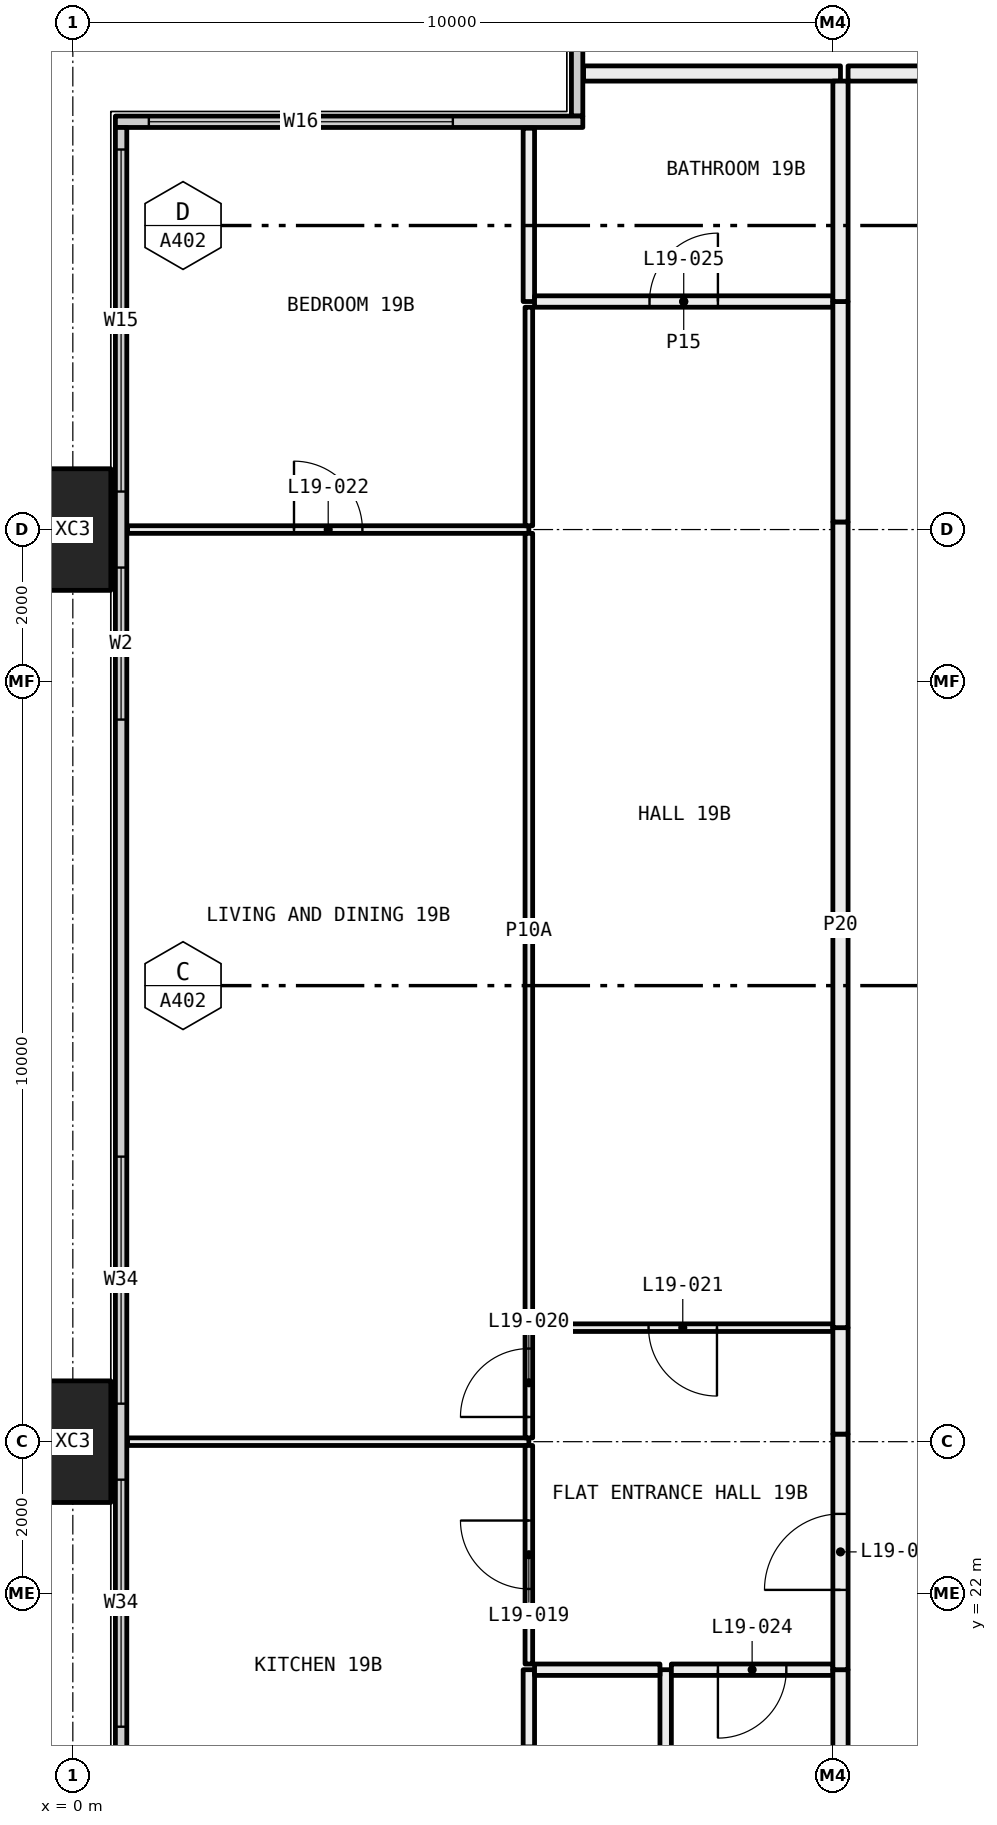
"""IFC4 building model, lengths in metres.
Left out: names, types, materials, properties, quantities, classifications, styles, units other than length and angle.
Written with IfcOpenShell. Run it as: python <this file> out.ifc"""

import sys

from ifc_helpers import new_model, si_unit, direction, frame, frame_2d, origin, origin_2d, place, context, subcontext, project, spatial, rectangle, hollow_rectangle, extrude, element, fill, save


model = new_model("IFC4")
c1 = context("Model", 3, precision=1e-05, world=origin(), true_north=direction((0.0, 1.0)))
c2 = subcontext(c1, "Body", "Model", "MODEL_VIEW")
j1 = project(units=[si_unit("LENGTHUNIT", "METRE"), si_unit("PLANEANGLEUNIT", "RADIAN")], contexts=[c1])
p1 = place(None, origin())
s1 = spatial("IfcSite", under=j1, at=p1, CompositionType="ELEMENT")
p2 = place(p1, origin())
s2 = spatial("IfcBuilding", under=s1, at=p2, CompositionType="ELEMENT")
p3 = place(p2, frame((0.0, 0.0, 78.3)))
s3 = spatial("IfcBuildingStorey", under=s2, at=p3, CompositionType="ELEMENT", Elevation=78.3)
for number, where, z_axis, x_axis in (
    (1, (0.0, 24.0, -0.4), (0.0, 0.0, 1.0), (0.0, 1.0, 0.0)),
    (2, (0.0, 36.0, -0.4), (0.0, 0.0, 1.0), (0.0, 1.0, 0.0)),
):
    element("IfcColumn", number, at=place(p3, frame(where, z_axis=z_axis, x_axis=x_axis)), inside=s3, PredefinedType="COLUMN", context=c2, shape_type="SweptSolid", body=[
        extrude(hollow_rectangle(XDim=1.6, YDim=1.0, WallThickness=0.065, at=origin_2d()), origin(), (0.0, 0.0, 1.0), 3.45),
    ])
p4 = place(p3, frame((6.635, 41.44, 0.0), z_axis=(0.0, 0.0, 1.0), x_axis=(0.0, 1.0, 0.0)))
e3 = element("IfcWall", 3, at=p4, inside=s3, PredefinedType="ELEMENTEDWALL", context=c2, shape_type="SweptSolid", body=[
    extrude(rectangle(XDim=5.85, YDim=0.15, at=frame_2d((2.925, 0.0))), origin(), (0.0, 0.0, 1.0), 3.05),
])
p5 = place(p4, frame((1.56, 0.0, 0.45)))
e4 = element("IfcOpeningElement", 4, at=p5, cuts=e3, PredefinedType="OPENING", context=c2, shape_type="SweptSolid", body=[
    extrude(rectangle(XDim=4.0, YDim=2.55, at=frame_2d((2.0, 1.275))), frame((0.0, 0.085, 0.0), z_axis=(0.0, -1.0, 0.0), x_axis=(1.0, 0.0, 0.0)), (0.0, 0.0, 1.0), 0.17),
])
p6 = place(p3, frame((0.56, 41.365, 0.0), z_axis=(0.0, 0.0, 1.0), x_axis=(1.0, 0.0, 0.0)))
e5 = element("IfcWall", 5, at=p6, inside=s3, PredefinedType="ELEMENTEDWALL", context=c2, shape_type="SweptSolid", body=[
    extrude(rectangle(XDim=6.15, YDim=0.15, at=frame_2d((3.075, 0.0))), origin(), (0.0, 0.0, 1.0), 3.05),
])
p7 = place(p6, frame((0.44, 0.0, 0.45)))
e6 = element("IfcOpeningElement", 6, at=p7, cuts=e5, PredefinedType="OPENING", context=c2, shape_type="SweptSolid", body=[
    extrude(rectangle(XDim=4.0, YDim=2.55, at=frame_2d((2.0, 1.275))), frame((0.0, 0.085, 0.0), z_axis=(0.0, -1.0, 0.0), x_axis=(1.0, 0.0, 0.0)), (0.0, 0.0, 1.0), 0.17),
])
p8 = place(p3, frame((0.635, 6.71, 0.0), z_axis=(0.0, 0.0, 1.0), x_axis=(0.0, 1.0, 0.0)))
e7 = element("IfcWall", 7, at=p8, inside=s3, PredefinedType="ELEMENTEDWALL", context=c2, shape_type="SweptSolid", body=[
    extrude(rectangle(XDim=34.58, YDim=0.15, at=frame_2d((17.29, 0.0))), origin(), (0.0, 0.0, 1.0), 3.05),
])
p9 = place(p8, frame((0.29, 0.0, 0.45)))
e8 = element("IfcOpeningElement", 8, at=p9, cuts=e7, PredefinedType="OPENING", context=c2, shape_type="SweptSolid", body=[
    extrude(rectangle(XDim=4.5, YDim=2.55, at=frame_2d((2.25, 1.275))), frame((0.0, 0.085, 0.0), z_axis=(0.0, -1.0, 0.0), x_axis=(1.0, 0.0, 0.0)), (0.0, 0.0, 1.0), 0.17),
])
p10 = place(p8, frame((5.79, 0.0, 0.45)))
e9 = element("IfcOpeningElement", 9, at=p10, cuts=e7, PredefinedType="OPENING", context=c2, shape_type="SweptSolid", body=[
    extrude(rectangle(XDim=3.25, YDim=2.55, at=frame_2d((1.625, 1.275))), frame((0.0, 0.085, 0.0), z_axis=(0.0, -1.0, 0.0), x_axis=(1.0, 0.0, 0.0)), (0.0, 0.0, 1.0), 0.17),
])
p11 = place(p8, frame((13.54, 0.0, 0.45)))
e10 = element("IfcOpeningElement", 10, at=p11, cuts=e7, PredefinedType="OPENING", context=c2, shape_type="SweptSolid", body=[
    extrude(rectangle(XDim=3.25, YDim=2.55, at=frame_2d((1.625, 1.275))), frame((0.0, 0.085, 0.0), z_axis=(0.0, -1.0, 0.0), x_axis=(1.0, 0.0, 0.0)), (0.0, 0.0, 1.0), 0.17),
])
p12 = place(p8, frame((17.79, 0.0, 0.45)))
e11 = element("IfcOpeningElement", 11, at=p12, cuts=e7, PredefinedType="OPENING", context=c2, shape_type="SweptSolid", body=[
    extrude(rectangle(XDim=3.25, YDim=2.55, at=frame_2d((1.625, 1.275))), frame((0.0, 0.085, 0.0), z_axis=(0.0, -1.0, 0.0), x_axis=(1.0, 0.0, 0.0)), (0.0, 0.0, 1.0), 0.17),
])
p13 = place(p8, frame((26.79, 0.0, 0.45)))
e12 = element("IfcOpeningElement", 12, at=p13, cuts=e7, PredefinedType="OPENING", context=c2, shape_type="SweptSolid", body=[
    extrude(rectangle(XDim=2.0, YDim=2.55, at=frame_2d((1.0, 1.275))), frame((0.0, 0.085, 0.0), z_axis=(0.0, -1.0, 0.0), x_axis=(1.0, 0.0, 0.0)), (0.0, 0.0, 1.0), 0.17),
])
p14 = place(p8, frame((29.79, 0.0, 0.45)))
e13 = element("IfcOpeningElement", 13, at=p14, cuts=e7, PredefinedType="OPENING", context=c2, shape_type="SweptSolid", body=[
    extrude(rectangle(XDim=4.5, YDim=2.55, at=frame_2d((2.25, 1.275))), frame((0.0, 0.085, 0.0), z_axis=(0.0, -1.0, 0.0), x_axis=(1.0, 0.0, 0.0)), (0.0, 0.0, 1.0), 0.17),
])
p15 = place(p3, frame((6.0, 24.0, 0.0), z_axis=(0.0, 0.0, 1.0), x_axis=(-1.0, 0.0, 0.0)))
e14 = element("IfcWall", 14, at=p15, inside=s3, PredefinedType="PARTITIONING", context=c2, shape_type="SweptSolid", body=[
    extrude(rectangle(XDim=5.28, YDim=0.1, at=frame_2d((2.64, 0.0))), origin(), (0.0, 0.0, 1.0), 2.45),
])
p16 = place(p3, frame((6.0, 18.1, 0.0), z_axis=(0.0, 0.0, 1.0), x_axis=(0.0, 1.0, 0.0)))
e15 = element("IfcWall", 15, at=p16, inside=s3, PredefinedType="PARTITIONING", context=c2, shape_type="SweptSolid", body=[
    extrude(rectangle(XDim=2.9, YDim=0.15, at=frame_2d((1.45, 0.0))), origin(), (0.0, 0.0, 1.0), 3.05),
])
p17 = place(p16, frame((1.0, 0.0, 0.0)))
e16 = element("IfcOpeningElement", 16, at=p17, cuts=e15, PredefinedType="OPENING", context=c2, shape_type="SweptSolid", body=[
    extrude(rectangle(XDim=0.9, YDim=2.1, at=frame_2d((0.45, 1.05))), frame((0.0, 0.085, 0.0), z_axis=(0.0, -1.0, 0.0), x_axis=(1.0, 0.0, 0.0)), (0.0, 0.0, 1.0), 0.17),
])
p18 = place(p3, frame((6.0, 21.075, 0.0), z_axis=(0.0, 0.0, 1.0), x_axis=(0.0, 1.0, 0.0)))
e17 = element("IfcWall", 17, at=p18, inside=s3, PredefinedType="PARTITIONING", context=c2, shape_type="SweptSolid", body=[
    extrude(rectangle(XDim=2.875, YDim=0.1, at=frame_2d((1.438, 0.0))), origin(), (0.0, 0.0, 1.0), 2.45),
])
p19 = place(p18, frame((0.988, 0.0, 0.0)))
e18 = element("IfcOpeningElement", 18, at=p19, cuts=e17, PredefinedType="OPENING", context=c2, shape_type="SweptSolid", body=[
    extrude(rectangle(XDim=0.9, YDim=2.1, at=frame_2d((0.45, 1.05))), frame((0.0, 0.06, 0.0), z_axis=(0.0, -1.0, 0.0), x_axis=(1.0, 0.0, 0.0)), (0.0, 0.0, 1.0), 0.12),
])
p20 = place(p3, frame((6.0, 36.0, 0.0), z_axis=(0.0, 0.0, 1.0), x_axis=(-1.0, 0.0, 0.0)))
e19 = element("IfcWall", 19, at=p20, inside=s3, PredefinedType="PARTITIONING", context=c2, shape_type="SweptSolid", body=[
    extrude(rectangle(XDim=5.28, YDim=0.1, at=frame_2d((2.64, 0.0))), origin(), (0.0, 0.0, 1.0), 2.45),
])
p21 = place(p20, frame((2.19, 0.0, 0.0)))
e20 = element("IfcOpeningElement", 20, at=p21, cuts=e19, PredefinedType="OPENING", context=c2, shape_type="SweptSolid", body=[
    extrude(rectangle(XDim=0.9, YDim=2.1, at=frame_2d((0.45, 1.05))), frame((0.0, 0.06, 0.0), z_axis=(0.0, -1.0, 0.0), x_axis=(1.0, 0.0, 0.0)), (0.0, 0.0, 1.0), 0.12),
])
p22 = place(p3, frame((6.0, 24.05, 0.0), z_axis=(0.0, 0.0, 1.0), x_axis=(0.0, 1.0, 0.0)))
e21 = element("IfcWall", 21, at=p22, inside=s3, PredefinedType="PARTITIONING", context=c2, shape_type="SweptSolid", body=[
    extrude(rectangle(XDim=1.45, YDim=0.1, at=frame_2d((0.725, 0.0))), origin(), (0.0, 0.0, 1.0), 2.45),
])
p23 = place(p22, frame((0.275, 0.0, 0.0)))
e22 = element("IfcOpeningElement", 22, at=p23, cuts=e21, PredefinedType="OPENING", context=c2, shape_type="SweptSolid", body=[
    extrude(rectangle(XDim=0.9, YDim=2.1, at=frame_2d((0.45, 1.05))), frame((0.0, 0.06, 0.0), z_axis=(0.0, -1.0, 0.0), x_axis=(1.0, 0.0, 0.0)), (0.0, 0.0, 1.0), 0.12),
])
p24 = place(p3, frame((6.0, 25.5, 0.0), z_axis=(0.0, 0.0, 1.0), x_axis=(0.0, 1.0, 0.0)))
e23 = element("IfcWall", 23, at=p24, inside=s3, PredefinedType="PARTITIONING", context=c2, shape_type="SweptSolid", body=[
    extrude(rectangle(XDim=10.45, YDim=0.1, at=frame_2d((5.225, 0.0))), origin(), (0.0, 0.0, 1.0), 2.45),
])
p25 = place(p3, frame((6.0, 36.05, 0.0), z_axis=(0.0, 0.0, 1.0), x_axis=(0.0, 1.0, 0.0)))
e24 = element("IfcWall", 24, at=p25, inside=s3, PredefinedType="PARTITIONING", context=c2, shape_type="SweptSolid", body=[
    extrude(rectangle(XDim=2.875, YDim=0.1, at=frame_2d((1.438, 0.0))), origin(), (0.0, 0.0, 1.0), 2.45),
])
p26 = place(p3, frame((6.0, 39.0, 0.0), z_axis=(0.0, 0.0, 1.0), x_axis=(0.0, 1.0, 0.0)))
e25 = element("IfcWall", 25, at=p26, inside=s3, PredefinedType="PARTITIONING", context=c2, shape_type="SweptSolid", body=[
    extrude(rectangle(XDim=2.28, YDim=0.15, at=frame_2d((1.14, 0.0))), origin(), (0.0, 0.0, 1.0), 3.05),
])
p27 = place(p3, frame((7.8, 18.1, 0.0), z_axis=(0.0, 0.0, 1.0), x_axis=(0.0, 1.0, 0.0)))
e26 = element("IfcWall", 26, at=p27, inside=s3, PredefinedType="PARTITIONING", context=c2, shape_type="SweptSolid", body=[
    extrude(rectangle(XDim=2.9, YDim=0.15, at=frame_2d((1.45, 0.0))), origin(), (0.0, 0.0, 1.0), 3.05),
])
p28 = place(p3, frame((7.725, 21.0, 0.0), z_axis=(0.0, 0.0, 1.0), x_axis=(-1.0, 0.0, 0.0)))
e27 = element("IfcWall", 27, at=p28, inside=s3, PredefinedType="PARTITIONING", context=c2, shape_type="SweptSolid", body=[
    extrude(rectangle(XDim=1.65, YDim=0.15, at=frame_2d((0.825, 0.0))), origin(), (0.0, 0.0, 1.0), 3.05),
])
p29 = place(p3, frame((10.0, 21.0, 0.0), z_axis=(0.0, 0.0, 1.0), x_axis=(-1.0, 0.0, 0.0)))
e28 = element("IfcWall", 28, at=p29, inside=s3, PredefinedType="PARTITIONING", context=c2, shape_type="SweptSolid", body=[
    extrude(rectangle(XDim=2.125, YDim=0.15, at=frame_2d((1.062, 0.0))), origin(), (0.0, 0.0, 1.0), 3.05),
])
p30 = place(p29, frame((0.613, 0.0, 0.0)))
e29 = element("IfcOpeningElement", 29, at=p30, cuts=e28, PredefinedType="OPENING", context=c2, shape_type="SweptSolid", body=[
    extrude(rectangle(XDim=0.9, YDim=2.1, at=frame_2d((0.45, 1.05))), frame((0.0, 0.085, 0.0), z_axis=(0.0, -1.0, 0.0), x_axis=(1.0, 0.0, 0.0)), (0.0, 0.0, 1.0), 0.17),
])
p31 = place(p3, frame((10.1, 18.1, 0.0), z_axis=(0.0, 0.0, 1.0), x_axis=(0.0, 1.0, 0.0)))
e30 = element("IfcWall", 30, at=p31, inside=s3, PredefinedType="PARTITIONING", context=c2, shape_type="SweptSolid", body=[
    extrude(rectangle(XDim=2.9, YDim=0.2, at=frame_2d((1.45, 0.0))), origin(), (0.0, 0.0, 1.0), 3.05),
])
p32 = place(p3, frame((10.0, 25.5, 0.0), z_axis=(0.0, 0.0, 1.0), x_axis=(-1.0, 0.0, 0.0)))
e31 = element("IfcWall", 31, at=p32, inside=s3, PredefinedType="PARTITIONING", context=c2, shape_type="SweptSolid", body=[
    extrude(rectangle(XDim=3.95, YDim=0.1, at=frame_2d((1.975, 0.0))), origin(), (0.0, 0.0, 1.0), 3.05),
])
p33 = place(p32, frame((1.525, 0.0, 0.0)))
e32 = element("IfcOpeningElement", 32, at=p33, cuts=e31, PredefinedType="OPENING", context=c2, shape_type="SweptSolid", body=[
    extrude(rectangle(XDim=0.9, YDim=2.1, at=frame_2d((0.45, 1.05))), frame((0.0, 0.06, 0.0), z_axis=(0.0, -1.0, 0.0), x_axis=(1.0, 0.0, 0.0)), (0.0, 0.0, 1.0), 0.12),
])
p34 = place(p3, frame((10.1, 21.0, 0.0), z_axis=(0.0, 0.0, 1.0), x_axis=(0.0, 1.0, 0.0)))
e33 = element("IfcWall", 33, at=p34, inside=s3, PredefinedType="PARTITIONING", context=c2, shape_type="SweptSolid", body=[
    extrude(rectangle(XDim=3.1, YDim=0.2, at=frame_2d((1.55, 0.0))), origin(), (0.0, 0.0, 1.0), 2.45),
])
p35 = place(p34, frame((1.05, 0.0, 0.0)))
e34 = element("IfcOpeningElement", 34, at=p35, cuts=e33, PredefinedType="OPENING", context=c2, shape_type="SweptSolid", body=[
    extrude(rectangle(XDim=1.0, YDim=2.1, at=frame_2d((0.5, 1.05))), frame((0.0, 0.11, 0.0), z_axis=(0.0, -1.0, 0.0), x_axis=(1.0, 0.0, 0.0)), (0.0, 0.0, 1.0), 0.22),
])
p36 = place(p3, frame((10.1, 24.1, 0.0), z_axis=(0.0, 0.0, 1.0), x_axis=(0.0, 1.0, 0.0)))
e35 = element("IfcWall", 35, at=p36, inside=s3, PredefinedType="PARTITIONING", context=c2, shape_type="SweptSolid", body=[
    extrude(rectangle(XDim=1.4, YDim=0.2, at=frame_2d((0.7, 0.0))), origin(), (0.0, 0.0, 1.0), 3.05),
])
p37 = place(p3, frame((10.0, 39.0, 0.0), z_axis=(0.0, 0.0, 1.0), x_axis=(-1.0, 0.0, 0.0)))
e36 = element("IfcWall", 36, at=p37, inside=s3, PredefinedType="PARTITIONING", context=c2, shape_type="SweptSolid", body=[
    extrude(rectangle(XDim=3.925, YDim=0.15, at=frame_2d((1.962, 0.0))), origin(), (0.0, 0.0, 1.0), 3.05),
])
p38 = place(p37, frame((1.512, 0.0, 0.0)))
e37 = element("IfcOpeningElement", 37, at=p38, cuts=e36, PredefinedType="OPENING", context=c2, shape_type="SweptSolid", body=[
    extrude(rectangle(XDim=0.9, YDim=2.1, at=frame_2d((0.45, 1.05))), frame((0.0, 0.085, 0.0), z_axis=(0.0, -1.0, 0.0), x_axis=(1.0, 0.0, 0.0)), (0.0, 0.0, 1.0), 0.17),
])
p39 = place(p3, frame((10.1, 25.5, 0.0), z_axis=(0.0, 0.0, 1.0), x_axis=(0.0, 1.0, 0.0)))
e38 = element("IfcWall", 38, at=p39, inside=s3, PredefinedType="PARTITIONING", context=c2, shape_type="SweptSolid", body=[
    extrude(rectangle(XDim=10.6, YDim=0.2, at=frame_2d((5.3, 0.0))), origin(), (0.0, 0.0, 1.0), 2.45),
])
p40 = place(p3, frame((10.1, 36.1, 0.0), z_axis=(0.0, 0.0, 1.0), x_axis=(0.0, 1.0, 0.0)))
e39 = element("IfcWall", 39, at=p40, inside=s3, PredefinedType="PARTITIONING", context=c2, shape_type="SweptSolid", body=[
    extrude(rectangle(XDim=2.9, YDim=0.2, at=frame_2d((1.45, 0.0))), origin(), (0.0, 0.0, 1.0), 3.05),
])
p41 = place(p3, frame((10.1, 42.0, 0.0), z_axis=(0.0, 0.0, 1.0), x_axis=(-1.0, 0.0, 0.0)))
e40 = element("IfcWall", 40, at=p41, inside=s3, PredefinedType="PARTITIONING", context=c2, shape_type="SweptSolid", body=[
    extrude(rectangle(XDim=3.38, YDim=0.2, at=frame_2d((1.69, 0.0))), origin(), (0.0, 0.0, 1.0), 3.05),
])
p42 = place(p3, frame((10.1, 39.0, 0.0), z_axis=(0.0, 0.0, 1.0), x_axis=(0.0, 1.0, 0.0)))
e41 = element("IfcWall", 41, at=p42, inside=s3, PredefinedType="PARTITIONING", context=c2, shape_type="SweptSolid", body=[
    extrude(rectangle(XDim=2.9, YDim=0.2, at=frame_2d((1.45, 0.0))), origin(), (0.0, 0.0, 1.0), 3.05),
])
p43 = place(p3, frame((10.2, 42.0, 0.0), z_axis=(0.0, 0.0, 1.0), x_axis=(1.0, 0.0, 0.0)))
e42 = element("IfcWall", 42, at=p43, inside=s3, PredefinedType="PARTITIONING", context=c2, shape_type="SweptSolid", body=[
    extrude(rectangle(XDim=1.8, YDim=0.2, at=frame_2d((0.9, 0.0))), origin(), (0.0, 0.0, 1.0), 3.05),
])
p44 = place(p7, origin())
e43 = element("IfcWindow", 43, at=p44, inside=s3, PartitioningType="SINGLE_PANEL", PredefinedType="WINDOW", context=c2, shape_type="SweptSolid", body=[
    extrude(rectangle(XDim=4.0, YDim=2.55, at=frame_2d((2.0, 1.275))), frame((0.0, 0.03, 0.0), z_axis=(0.0, -1.0, 0.0), x_axis=(1.0, 0.0, 0.0)), (0.0, 0.0, 1.0), 0.06),
])
fill(e6, e43)
p45 = place(p11, origin())
e44 = element("IfcWindow", 44, at=p45, inside=s3, PartitioningType="SINGLE_PANEL", PredefinedType="WINDOW", context=c2, shape_type="SweptSolid", body=[
    extrude(rectangle(XDim=3.25, YDim=2.55, at=frame_2d((1.625, 1.275))), frame((0.0, 0.03, 0.0), z_axis=(0.0, -1.0, 0.0), x_axis=(1.0, 0.0, 0.0)), (0.0, 0.0, 1.0), 0.06),
])
fill(e10, e44)
p46 = place(p12, origin())
e45 = element("IfcWindow", 45, at=p46, inside=s3, PartitioningType="SINGLE_PANEL", PredefinedType="WINDOW", context=c2, shape_type="SweptSolid", body=[
    extrude(rectangle(XDim=3.25, YDim=2.55, at=frame_2d((1.625, 1.275))), frame((0.0, 0.03, 0.0), z_axis=(0.0, -1.0, 0.0), x_axis=(1.0, 0.0, 0.0)), (0.0, 0.0, 1.0), 0.06),
])
fill(e11, e45)
p47 = place(p13, origin())
e46 = element("IfcWindow", 46, at=p47, inside=s3, PartitioningType="SINGLE_PANEL", PredefinedType="WINDOW", context=c2, shape_type="SweptSolid", body=[
    extrude(rectangle(XDim=2.0, YDim=2.55, at=frame_2d((1.0, 1.275))), frame((0.0, 0.03, 0.0), z_axis=(0.0, -1.0, 0.0), x_axis=(1.0, 0.0, 0.0)), (0.0, 0.0, 1.0), 0.06),
])
fill(e12, e46)
p48 = place(p14, origin())
e47 = element("IfcWindow", 47, at=p48, inside=s3, PartitioningType="SINGLE_PANEL", PredefinedType="WINDOW", context=c2, shape_type="SweptSolid", body=[
    extrude(rectangle(XDim=4.5, YDim=2.55, at=frame_2d((2.25, 1.275))), frame((0.0, 0.03, 0.0), z_axis=(0.0, -1.0, 0.0), x_axis=(1.0, 0.0, 0.0)), (0.0, 0.0, 1.0), 0.06),
])
fill(e13, e47)
p49 = place(p35, origin())
e48 = element("IfcDoor", 48, at=p49, inside=s3, OperationType="SINGLE_SWING_RIGHT", PredefinedType="DOOR", context=c2, shape_type="SweptSolid", body=[
    extrude(rectangle(XDim=1.0, YDim=2.1, at=frame_2d((0.5, 1.05))), frame((0.0, 0.025, 0.0), z_axis=(0.0, -1.0, 0.0), x_axis=(1.0, 0.0, 0.0)), (0.0, 0.0, 1.0), 0.05),
])
fill(e34, e48)
p50 = place(p19, origin())
e49 = element("IfcDoor", 49, at=p50, inside=s3, OperationType="SINGLE_SWING_LEFT", PredefinedType="DOOR", context=c2, shape_type="SweptSolid", body=[
    extrude(rectangle(XDim=0.9, YDim=2.1, at=frame_2d((0.45, 1.05))), frame((0.0, 0.025, 0.0), z_axis=(0.0, -1.0, 0.0), x_axis=(1.0, 0.0, 0.0)), (0.0, 0.0, 1.0), 0.05),
])
fill(e18, e49)
p51 = place(p23, origin())
e50 = element("IfcDoor", 50, at=p51, inside=s3, OperationType="SINGLE_SWING_RIGHT", PredefinedType="DOOR", context=c2, shape_type="SweptSolid", body=[
    extrude(rectangle(XDim=0.9, YDim=2.1, at=frame_2d((0.45, 1.05))), frame((0.0, 0.025, 0.0), z_axis=(0.0, -1.0, 0.0), x_axis=(1.0, 0.0, 0.0)), (0.0, 0.0, 1.0), 0.05),
])
fill(e22, e50)
p52 = place(p33, origin())
e51 = element("IfcDoor", 51, at=p52, inside=s3, OperationType="SINGLE_SWING_RIGHT", PredefinedType="DOOR", context=c2, shape_type="SweptSolid", body=[
    extrude(rectangle(XDim=0.9, YDim=2.1, at=frame_2d((0.45, 1.05))), frame((0.0, 0.025, 0.0), z_axis=(0.0, -1.0, 0.0), x_axis=(1.0, 0.0, 0.0)), (0.0, 0.0, 1.0), 0.05),
])
fill(e32, e51)
p53 = place(p21, frame((0.9, 0.0, 0.0), x_axis=(-1.0, 0.0, 0.0)))
e52 = element("IfcDoor", 52, at=p53, inside=s3, OperationType="SINGLE_SWING_RIGHT", PredefinedType="DOOR", context=c2, shape_type="SweptSolid", body=[
    extrude(rectangle(XDim=0.9, YDim=2.1, at=frame_2d((0.45, 1.05))), frame((0.0, 0.025, 0.0), z_axis=(0.0, -1.0, 0.0), x_axis=(1.0, 0.0, 0.0)), (0.0, 0.0, 1.0), 0.05),
])
fill(e20, e52)
p54 = place(p30, origin())
e53 = element("IfcDoor", 53, at=p54, inside=s3, OperationType="SINGLE_SWING_LEFT", PredefinedType="DOOR", context=c2, shape_type="SweptSolid", body=[
    extrude(rectangle(XDim=0.9, YDim=2.1, at=frame_2d((0.45, 1.05))), frame((0.0, 0.025, 0.0), z_axis=(0.0, -1.0, 0.0), x_axis=(1.0, 0.0, 0.0)), (0.0, 0.0, 1.0), 0.05),
])
fill(e29, e53)
p55 = place(p38, frame((0.9, 0.0, 0.0), x_axis=(-1.0, 0.0, 0.0)))
e54 = element("IfcDoor", 54, at=p55, inside=s3, OperationType="SINGLE_SWING_LEFT", PredefinedType="DOOR", context=c2, shape_type="SweptSolid", body=[
    extrude(rectangle(XDim=0.9, YDim=2.1, at=frame_2d((0.45, 1.05))), frame((0.0, 0.025, 0.0), z_axis=(0.0, -1.0, 0.0), x_axis=(1.0, 0.0, 0.0)), (0.0, 0.0, 1.0), 0.05),
])
fill(e37, e54)
save(model, sys.argv[1])
